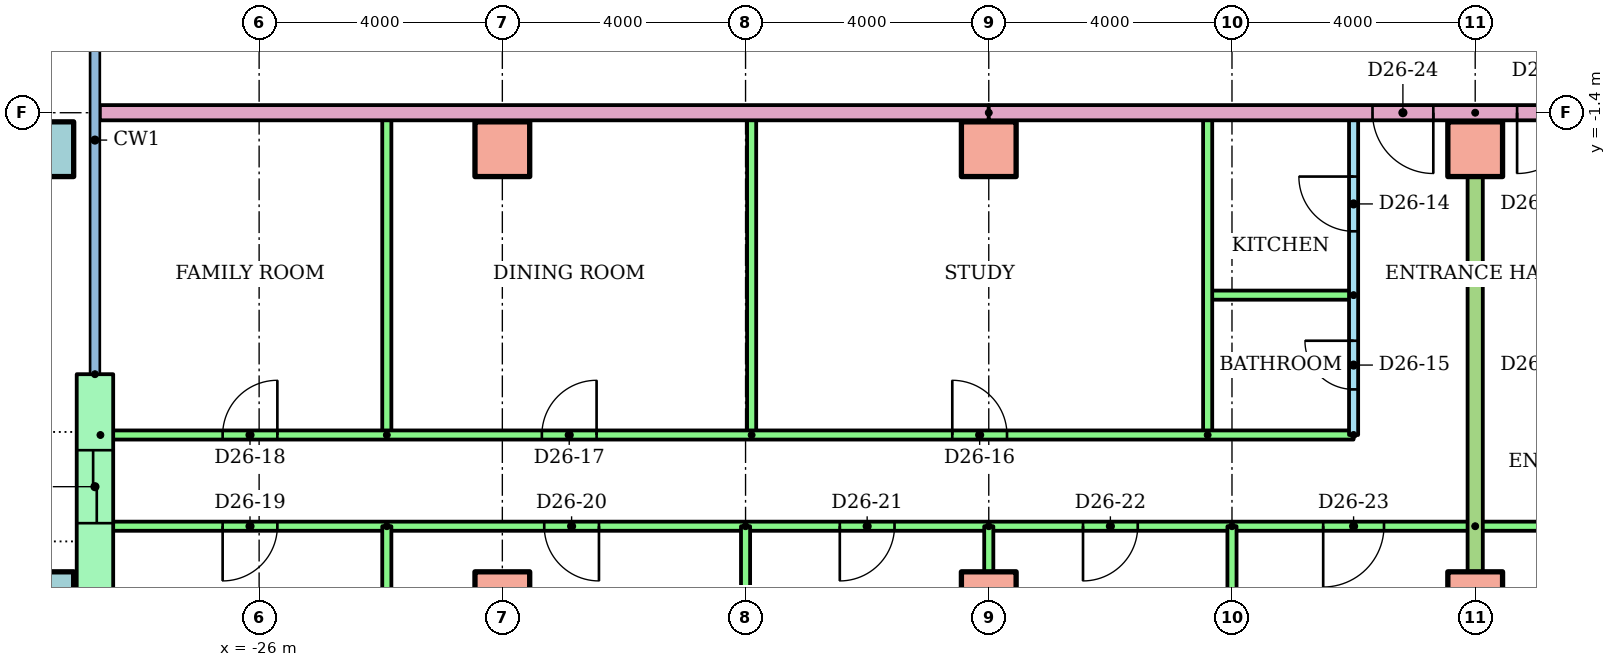
"""IFC4 building model, lengths in metres.
Left out: names, types, materials, properties, quantities, classifications, styles, units other than length and angle.
Written with IfcOpenShell. Run it as: python <this file> out.ifc"""

import sys

from ifc_helpers import new_model, si_unit, direction, frame, frame_2d, origin, origin_2d, place, context, subcontext, project, spatial, rectangle, hollow_rectangle, extrude, element, fill, save


model = new_model("IFC4")
c1 = context("Model", 3, precision=1e-05, world=origin(), true_north=direction((0.0, 1.0)))
c2 = subcontext(c1, "Body", "Model", "MODEL_VIEW")
j1 = project(units=[si_unit("LENGTHUNIT", "METRE"), si_unit("PLANEANGLEUNIT", "RADIAN")], contexts=[c1])
p1 = place(None, origin())
s1 = spatial("IfcSite", under=j1, at=p1, CompositionType="ELEMENT")
p2 = place(p1, origin())
s2 = spatial("IfcBuilding", under=s1, at=p2, CompositionType="ELEMENT")
p3 = place(p2, frame((0.0, 0.0, 99.9)))
s3 = spatial("IfcBuildingStorey", under=s2, at=p3, CompositionType="ELEMENT", Elevation=99.9)
p4 = place(p3, frame((-29.5, -9.4, 0.0)))
e1 = element("IfcColumn", 1, at=p4, inside=s3, PredefinedType="COLUMN", context=c2, shape_type="SweptSolid", body=[
    extrude(hollow_rectangle(XDim=0.9, YDim=0.9, WallThickness=0.045, at=origin_2d()), origin(), (0.0, 0.0, 1.0), 3.2),
])
for number, where in (
    (2, (-22.0, -9.4, 0.0)),
    (3, (-14.0, -9.4, 0.0)),
    (4, (-6.0, -9.4, 0.0)),
):
    element("IfcColumn", number, at=place(p3, frame(where)), inside=s3, PredefinedType="COLUMN", context=c2, shape_type="SweptSolid", body=[
        extrude(rectangle(XDim=0.9, YDim=0.9, at=origin_2d()), origin(), (0.0, 0.0, 1.0), 3.2),
    ])
p5 = place(p3, frame((-29.5, -2.0, 0.0)))
e5 = element("IfcColumn", 5, at=p5, inside=s3, PredefinedType="COLUMN", context=c2, shape_type="SweptSolid", body=[
    extrude(hollow_rectangle(XDim=0.9, YDim=0.9, WallThickness=0.045, at=origin_2d()), origin(), (0.0, 0.0, 1.0), 3.2),
])
for number, where in (
    (6, (-22.0, -2.0, 0.0)),
    (7, (-14.0, -2.0, 0.0)),
    (8, (-6.0, -2.0, 0.0)),
):
    element("IfcColumn", number, at=place(p3, frame(where)), inside=s3, PredefinedType="COLUMN", context=c2, shape_type="SweptSolid", body=[
        extrude(rectangle(XDim=0.9, YDim=0.9, at=origin_2d()), origin(), (0.0, 0.0, 1.0), 3.2),
    ])
p6 = place(p3, frame((-28.7, -5.7, 0.0), z_axis=(0.0, 0.0, 1.0), x_axis=(0.0, -1.0, 0.0)))
e9 = element("IfcWall", 9, at=p6, inside=s3, PredefinedType="STANDARD", context=c2, shape_type="SweptSolid", body=[
    extrude(rectangle(XDim=3.7, YDim=0.6, at=frame_2d((1.85, 0.0))), origin(), (0.0, 0.0, 1.0), 2.92),
])
p7 = place(p6, frame((1.25, 0.0, 0.0)))
e10 = element("IfcOpeningElement", 10, at=p7, cuts=e9, PredefinedType="OPENING", context=c2, shape_type="SweptSolid", body=[
    extrude(rectangle(XDim=1.2, YDim=2.1, at=frame_2d((0.6, 1.05))), frame((0.0, 0.31, 0.0), z_axis=(0.0, -1.0, 0.0), x_axis=(1.0, 0.0, 0.0)), (0.0, 0.0, 1.0), 0.62),
])
p8 = place(p3, frame((-8.0, -6.7, 0.0), z_axis=(0.0, 0.0, 1.0), x_axis=(0.0, 1.0, 0.0)))
e11 = element("IfcWall", 11, at=p8, inside=s3, PredefinedType="PARTITIONING", context=c2, shape_type="SweptSolid", body=[
    extrude(rectangle(XDim=5.3, YDim=0.15, at=frame_2d((2.65, 0.0))), origin(), (0.0, 0.0, 1.0), 2.4),
])
p9 = place(p8, frame((3.35, 0.0, 0.0)))
e12 = element("IfcOpeningElement", 12, at=p9, cuts=e11, PredefinedType="OPENING", context=c2, shape_type="SweptSolid", body=[
    extrude(rectangle(XDim=0.9, YDim=2.1, at=frame_2d((0.45, 1.05))), frame((0.0, 0.085, 0.0), z_axis=(0.0, -1.0, 0.0), x_axis=(1.0, 0.0, 0.0)), (0.0, 0.0, 1.0), 0.17),
])
p10 = place(p8, frame((0.75, 0.0, 0.0)))
e13 = element("IfcOpeningElement", 13, at=p10, cuts=e11, PredefinedType="OPENING", context=c2, shape_type="SweptSolid", body=[
    extrude(rectangle(XDim=0.8, YDim=2.1, at=frame_2d((0.4, 1.05))), frame((0.0, 0.085, 0.0), z_axis=(0.0, -1.0, 0.0), x_axis=(1.0, 0.0, 0.0)), (0.0, 0.0, 1.0), 0.17),
])
p11 = place(p3, frame((-8.0, -4.4, 0.0), z_axis=(0.0, 0.0, 1.0), x_axis=(-1.0, 0.0, 0.0)))
e14 = element("IfcWall", 14, at=p11, inside=s3, PredefinedType="PARTITIONING", context=c2, shape_type="SweptSolid", body=[
    extrude(rectangle(XDim=2.4, YDim=0.15, at=frame_2d((1.2, 0.0))), origin(), (0.0, 0.0, 1.0), 2.4),
])
for number, where, z_axis, x_axis in (
    (15, (-10.4, -6.7, 0.0), (0.0, 0.0, 1.0), (0.0, 1.0, 0.0)),
    (16, (-17.9, -6.7, 0.0), (0.0, 0.0, 1.0), (0.0, 1.0, 0.0)),
    (17, (-23.9, -6.7, 0.0), (0.0, 0.0, 1.0), (0.0, 1.0, 0.0)),
):
    element("IfcWall", number, at=place(p3, frame(where, z_axis=z_axis, x_axis=x_axis)), inside=s3, PredefinedType="PARTITIONING", context=c2, shape_type="SweptSolid", body=[
        extrude(rectangle(XDim=5.3, YDim=0.15, at=frame_2d((2.65, 0.0))), origin(), (0.0, 0.0, 1.0), 2.4),
    ])
p12 = place(p3, frame((-28.61, -6.7, 0.0)))
e18 = element("IfcWall", 18, at=p12, inside=s3, PredefinedType="PARTITIONING", context=c2, shape_type="SweptSolid", body=[
    extrude(rectangle(XDim=20.61, YDim=0.15, at=frame_2d((10.305, 0.0))), origin(), (0.0, 0.0, 1.0), 2.4),
])
p13 = place(p12, frame((14.01, 0.0, 0.0)))
e19 = element("IfcOpeningElement", 19, at=p13, cuts=e18, PredefinedType="OPENING", context=c2, shape_type="SweptSolid", body=[
    extrude(rectangle(XDim=0.9, YDim=2.1, at=frame_2d((0.45, 1.05))), frame((0.0, 0.085, 0.0), z_axis=(0.0, -1.0, 0.0), x_axis=(1.0, 0.0, 0.0)), (0.0, 0.0, 1.0), 0.17),
])
p14 = place(p12, frame((7.26, 0.0, 0.0)))
e20 = element("IfcOpeningElement", 20, at=p14, cuts=e18, PredefinedType="OPENING", context=c2, shape_type="SweptSolid", body=[
    extrude(rectangle(XDim=0.9, YDim=2.1, at=frame_2d((0.45, 1.05))), frame((0.0, 0.085, 0.0), z_axis=(0.0, -1.0, 0.0), x_axis=(1.0, 0.0, 0.0)), (0.0, 0.0, 1.0), 0.17),
])
p15 = place(p12, frame((2.01, 0.0, 0.0)))
e21 = element("IfcOpeningElement", 21, at=p15, cuts=e18, PredefinedType="OPENING", context=c2, shape_type="SweptSolid", body=[
    extrude(rectangle(XDim=0.9, YDim=2.1, at=frame_2d((0.45, 1.05))), frame((0.0, 0.085, 0.0), z_axis=(0.0, -1.0, 0.0), x_axis=(1.0, 0.0, 0.0)), (0.0, 0.0, 1.0), 0.17),
])
p16 = place(p3, frame((-6.0, -8.2, 0.0), z_axis=(0.0, 0.0, 1.0), x_axis=(-1.0, 0.0, 0.0)))
e22 = element("IfcWall", 22, at=p16, inside=s3, PredefinedType="PARTITIONING", context=c2, shape_type="SweptSolid", body=[
    extrude(rectangle(XDim=22.61, YDim=0.15, at=frame_2d((11.305, 0.0))), origin(), (0.0, 0.0, 1.0), 2.4),
])
p17 = place(p16, frame((19.7, 0.0, 0.0)))
e23 = element("IfcOpeningElement", 23, at=p17, cuts=e22, PredefinedType="OPENING", context=c2, shape_type="SweptSolid", body=[
    extrude(rectangle(XDim=0.9, YDim=2.1, at=frame_2d((0.45, 1.05))), frame((0.0, 0.085, 0.0), z_axis=(0.0, -1.0, 0.0), x_axis=(1.0, 0.0, 0.0)), (0.0, 0.0, 1.0), 0.17),
])
p18 = place(p16, frame((14.411, 0.0, 0.0)))
e24 = element("IfcOpeningElement", 24, at=p18, cuts=e22, PredefinedType="OPENING", context=c2, shape_type="SweptSolid", body=[
    extrude(rectangle(XDim=0.9, YDim=2.1, at=frame_2d((0.45, 1.05))), frame((0.0, 0.085, 0.0), z_axis=(0.0, -1.0, 0.0), x_axis=(1.0, 0.0, 0.0)), (0.0, 0.0, 1.0), 0.17),
])
p19 = place(p16, frame((9.55, 0.0, 0.0)))
e25 = element("IfcOpeningElement", 25, at=p19, cuts=e22, PredefinedType="OPENING", context=c2, shape_type="SweptSolid", body=[
    extrude(rectangle(XDim=0.9, YDim=2.1, at=frame_2d((0.45, 1.05))), frame((0.0, 0.085, 0.0), z_axis=(0.0, -1.0, 0.0), x_axis=(1.0, 0.0, 0.0)), (0.0, 0.0, 1.0), 0.17),
])
p20 = place(p16, frame((5.55, 0.0, 0.0)))
e26 = element("IfcOpeningElement", 26, at=p20, cuts=e22, PredefinedType="OPENING", context=c2, shape_type="SweptSolid", body=[
    extrude(rectangle(XDim=0.9, YDim=2.1, at=frame_2d((0.45, 1.05))), frame((0.0, 0.085, 0.0), z_axis=(0.0, -1.0, 0.0), x_axis=(1.0, 0.0, 0.0)), (0.0, 0.0, 1.0), 0.17),
])
p21 = place(p16, frame((1.5, 0.0, 0.0)))
e27 = element("IfcOpeningElement", 27, at=p21, cuts=e22, PredefinedType="OPENING", context=c2, shape_type="SweptSolid", body=[
    extrude(rectangle(XDim=1.0, YDim=2.1, at=frame_2d((0.5, 1.05))), frame((0.0, 0.085, 0.0), z_axis=(0.0, -1.0, 0.0), x_axis=(1.0, 0.0, 0.0)), (0.0, 0.0, 1.0), 0.17),
])
p22 = place(p3, frame((-23.9, -8.2, 0.0), z_axis=(0.0, 0.0, 1.0), x_axis=(0.0, -1.0, 0.0)))
e28 = element("IfcWall", 28, at=p22, inside=s3, PredefinedType="PARTITIONING", context=c2, shape_type="SweptSolid", body=[
    extrude(rectangle(XDim=6.22, YDim=0.15, at=frame_2d((3.11, 0.0))), origin(), (0.0, 0.0, 1.0), 2.4),
])
p23 = place(p3, frame((-18.0, -8.2, 0.0), z_axis=(0.0, 0.0, 1.0), x_axis=(0.0, -1.0, 0.0)))
e29 = element("IfcWall", 29, at=p23, inside=s3, PredefinedType="PARTITIONING", context=c2, shape_type="SweptSolid", body=[
    extrude(rectangle(XDim=8.021, YDim=0.15, at=frame_2d((4.01, 0.0))), origin(), (0.0, 0.0, 1.0), 2.4),
])
p24 = place(p3, frame((-14.0, -8.2, 0.0), z_axis=(0.0, 0.0, 1.0), x_axis=(0.0, -1.0, 0.0)))
e30 = element("IfcWall", 30, at=p24, inside=s3, PredefinedType="PARTITIONING", context=c2, shape_type="SweptSolid", body=[
    extrude(rectangle(XDim=8.01, YDim=0.15, at=frame_2d((4.005, 0.0))), origin(), (0.0, 0.0, 1.0), 2.4),
])
p25 = place(p3, frame((-10.0, -8.2, 0.0), z_axis=(0.0, 0.0, 1.0), x_axis=(0.0, -1.0, 0.0)))
e31 = element("IfcWall", 31, at=p25, inside=s3, PredefinedType="PARTITIONING", context=c2, shape_type="SweptSolid", body=[
    extrude(rectangle(XDim=8.021, YDim=0.15, at=frame_2d((4.01, 0.0))), origin(), (0.0, 0.0, 1.0), 2.4),
])
p26 = place(p3, frame((18.0, -8.2, 0.0), z_axis=(0.0, 0.0, 1.0), x_axis=(-1.0, 0.0, 0.0)))
e32 = element("IfcWall", 32, at=p26, inside=s3, PredefinedType="PARTITIONING", context=c2, shape_type="SweptSolid", body=[
    extrude(rectangle(XDim=24.0, YDim=0.15, at=frame_2d((12.0, 0.0))), origin(), (0.0, 0.0, 1.0), 2.4),
])
p27 = place(p26, frame((21.55, 0.0, 0.0)))
e33 = element("IfcOpeningElement", 33, at=p27, cuts=e32, PredefinedType="OPENING", context=c2, shape_type="SweptSolid", body=[
    extrude(rectangle(XDim=0.9, YDim=2.1, at=frame_2d((0.45, 1.05))), frame((0.0, 0.085, 0.0), z_axis=(0.0, -1.0, 0.0), x_axis=(1.0, 0.0, 0.0)), (0.0, 0.0, 1.0), 0.17),
])
p28 = place(p26, frame((17.55, 0.0, 0.0)))
e34 = element("IfcOpeningElement", 34, at=p28, cuts=e32, PredefinedType="OPENING", context=c2, shape_type="SweptSolid", body=[
    extrude(rectangle(XDim=0.9, YDim=2.1, at=frame_2d((0.45, 1.05))), frame((0.0, 0.085, 0.0), z_axis=(0.0, -1.0, 0.0), x_axis=(1.0, 0.0, 0.0)), (0.0, 0.0, 1.0), 0.17),
])
p29 = place(p26, frame((13.55, 0.0, 0.0)))
e35 = element("IfcOpeningElement", 35, at=p29, cuts=e32, PredefinedType="OPENING", context=c2, shape_type="SweptSolid", body=[
    extrude(rectangle(XDim=0.9, YDim=2.1, at=frame_2d((0.45, 1.05))), frame((0.0, 0.085, 0.0), z_axis=(0.0, -1.0, 0.0), x_axis=(1.0, 0.0, 0.0)), (0.0, 0.0, 1.0), 0.17),
])
p30 = place(p26, frame((9.55, 0.0, 0.0)))
e36 = element("IfcOpeningElement", 36, at=p30, cuts=e32, PredefinedType="OPENING", context=c2, shape_type="SweptSolid", body=[
    extrude(rectangle(XDim=0.9, YDim=2.1, at=frame_2d((0.45, 1.05))), frame((0.0, 0.085, 0.0), z_axis=(0.0, -1.0, 0.0), x_axis=(1.0, 0.0, 0.0)), (0.0, 0.0, 1.0), 0.17),
])
p31 = place(p26, frame((3.5, 0.0, 0.0)))
e37 = element("IfcOpeningElement", 37, at=p31, cuts=e32, PredefinedType="OPENING", context=c2, shape_type="SweptSolid", body=[
    extrude(rectangle(XDim=1.0, YDim=2.1, at=frame_2d((0.5, 1.05))), frame((0.0, 0.085, 0.0), z_axis=(0.0, -1.0, 0.0), x_axis=(1.0, 0.0, 0.0)), (0.0, 0.0, 1.0), 0.17),
])
p32 = place(p3, frame((-6.0, -1.4, 0.0), z_axis=(0.0, 0.0, 1.0), x_axis=(0.0, -1.0, 0.0)))
e38 = element("IfcWall", 38, at=p32, inside=s3, PredefinedType="PARTITIONING", context=c2, shape_type="SweptSolid", body=[
    extrude(rectangle(XDim=14.81, YDim=0.25, at=frame_2d((7.405, 0.0))), origin(), (0.0, 0.0, 1.0), 2.4),
])
p33 = place(p3, frame((-14.0, -1.4, 0.0), z_axis=(0.0, 0.0, 1.0), x_axis=(-1.0, 0.0, 0.0)))
e39 = element("IfcWall", 39, at=p33, inside=s3, PredefinedType="PARTITIONING", context=c2, shape_type="SweptSolid", body=[
    extrude(rectangle(XDim=14.62, YDim=0.25, at=frame_2d((7.31, 0.0))), origin(), (0.0, 0.0, 1.0), 2.4),
])
p34 = place(p3, frame((14.0, -1.4, 0.0), z_axis=(0.0, 0.0, 1.0), x_axis=(-1.0, 0.0, 0.0)))
e40 = element("IfcWall", 40, at=p34, inside=s3, PredefinedType="PARTITIONING", context=c2, shape_type="SweptSolid", body=[
    extrude(rectangle(XDim=28.0, YDim=0.25, at=frame_2d((14.0, 0.0))), origin(), (0.0, 0.0, 1.0), 2.4),
])
p35 = place(p34, frame((20.689, 0.0, 0.0)))
e41 = element("IfcOpeningElement", 41, at=p35, cuts=e40, PredefinedType="OPENING", context=c2, shape_type="SweptSolid", body=[
    extrude(rectangle(XDim=1.0, YDim=2.1, at=frame_2d((0.5, 1.05))), frame((0.0, 0.135, 0.0), z_axis=(0.0, -1.0, 0.0), x_axis=(1.0, 0.0, 0.0)), (0.0, 0.0, 1.0), 0.27),
])
p36 = place(p34, frame((18.311, 0.0, 0.0)))
e42 = element("IfcOpeningElement", 42, at=p36, cuts=e40, PredefinedType="OPENING", context=c2, shape_type="SweptSolid", body=[
    extrude(rectangle(XDim=1.0, YDim=2.1, at=frame_2d((0.5, 1.05))), frame((0.0, 0.135, 0.0), z_axis=(0.0, -1.0, 0.0), x_axis=(1.0, 0.0, 0.0)), (0.0, 0.0, 1.0), 0.27),
])
p37 = place(p9, origin())
e43 = element("IfcDoor", 43, at=p37, inside=s3, OperationType="SINGLE_SWING_RIGHT", PredefinedType="DOOR", context=c2, shape_type="SweptSolid", body=[
    extrude(rectangle(XDim=0.9, YDim=2.1, at=frame_2d((0.45, 1.05))), frame((0.0, 0.025, 0.0), z_axis=(0.0, -1.0, 0.0), x_axis=(1.0, 0.0, 0.0)), (0.0, 0.0, 1.0), 0.05),
])
fill(e12, e43)
p38 = place(p10, origin())
e44 = element("IfcDoor", 44, at=p38, inside=s3, OperationType="SINGLE_SWING_RIGHT", PredefinedType="DOOR", context=c2, shape_type="SweptSolid", body=[
    extrude(rectangle(XDim=0.8, YDim=2.1, at=frame_2d((0.4, 1.05))), frame((0.0, 0.025, 0.0), z_axis=(0.0, -1.0, 0.0), x_axis=(1.0, 0.0, 0.0)), (0.0, 0.0, 1.0), 0.05),
])
fill(e13, e44)
p39 = place(p13, origin())
e45 = element("IfcDoor", 45, at=p39, inside=s3, OperationType="SINGLE_SWING_LEFT", PredefinedType="DOOR", context=c2, shape_type="SweptSolid", body=[
    extrude(rectangle(XDim=0.9, YDim=2.1, at=frame_2d((0.45, 1.05))), frame((0.0, 0.025, 0.0), z_axis=(0.0, -1.0, 0.0), x_axis=(1.0, 0.0, 0.0)), (0.0, 0.0, 1.0), 0.05),
])
fill(e19, e45)
p40 = place(p14, origin())
e46 = element("IfcDoor", 46, at=p40, inside=s3, OperationType="SINGLE_SWING_RIGHT", PredefinedType="DOOR", context=c2, shape_type="SweptSolid", body=[
    extrude(rectangle(XDim=0.9, YDim=2.1, at=frame_2d((0.45, 1.05))), frame((0.0, 0.025, 0.0), z_axis=(0.0, -1.0, 0.0), x_axis=(1.0, 0.0, 0.0)), (0.0, 0.0, 1.0), 0.05),
])
fill(e20, e46)
p41 = place(p15, origin())
e47 = element("IfcDoor", 47, at=p41, inside=s3, OperationType="SINGLE_SWING_RIGHT", PredefinedType="DOOR", context=c2, shape_type="SweptSolid", body=[
    extrude(rectangle(XDim=0.9, YDim=2.1, at=frame_2d((0.45, 1.05))), frame((0.0, 0.025, 0.0), z_axis=(0.0, -1.0, 0.0), x_axis=(1.0, 0.0, 0.0)), (0.0, 0.0, 1.0), 0.05),
])
fill(e21, e47)
p42 = place(p17, origin())
e48 = element("IfcDoor", 48, at=p42, inside=s3, OperationType="SINGLE_SWING_RIGHT", PredefinedType="DOOR", context=c2, shape_type="SweptSolid", body=[
    extrude(rectangle(XDim=0.9, YDim=2.1, at=frame_2d((0.45, 1.05))), frame((0.0, 0.025, 0.0), z_axis=(0.0, -1.0, 0.0), x_axis=(1.0, 0.0, 0.0)), (0.0, 0.0, 1.0), 0.05),
])
fill(e23, e48)
p43 = place(p18, origin())
e49 = element("IfcDoor", 49, at=p43, inside=s3, OperationType="SINGLE_SWING_LEFT", PredefinedType="DOOR", context=c2, shape_type="SweptSolid", body=[
    extrude(rectangle(XDim=0.9, YDim=2.1, at=frame_2d((0.45, 1.05))), frame((0.0, 0.025, 0.0), z_axis=(0.0, -1.0, 0.0), x_axis=(1.0, 0.0, 0.0)), (0.0, 0.0, 1.0), 0.05),
])
fill(e24, e49)
p44 = place(p19, origin())
e50 = element("IfcDoor", 50, at=p44, inside=s3, OperationType="SINGLE_SWING_RIGHT", PredefinedType="DOOR", context=c2, shape_type="SweptSolid", body=[
    extrude(rectangle(XDim=0.9, YDim=2.1, at=frame_2d((0.45, 1.05))), frame((0.0, 0.025, 0.0), z_axis=(0.0, -1.0, 0.0), x_axis=(1.0, 0.0, 0.0)), (0.0, 0.0, 1.0), 0.05),
])
fill(e25, e50)
p45 = place(p20, origin())
e51 = element("IfcDoor", 51, at=p45, inside=s3, OperationType="SINGLE_SWING_RIGHT", PredefinedType="DOOR", context=c2, shape_type="SweptSolid", body=[
    extrude(rectangle(XDim=0.9, YDim=2.1, at=frame_2d((0.45, 1.05))), frame((0.0, 0.025, 0.0), z_axis=(0.0, -1.0, 0.0), x_axis=(1.0, 0.0, 0.0)), (0.0, 0.0, 1.0), 0.05),
])
fill(e26, e51)
p46 = place(p21, origin())
e52 = element("IfcDoor", 52, at=p46, inside=s3, OperationType="SINGLE_SWING_RIGHT", PredefinedType="DOOR", context=c2, shape_type="SweptSolid", body=[
    extrude(rectangle(XDim=1.0, YDim=2.1, at=frame_2d((0.5, 1.05))), frame((0.0, 0.025, 0.0), z_axis=(0.0, -1.0, 0.0), x_axis=(1.0, 0.0, 0.0)), (0.0, 0.0, 1.0), 0.05),
])
fill(e27, e52)
p47 = place(p35, origin())
e53 = element("IfcDoor", 53, at=p47, inside=s3, OperationType="SINGLE_SWING_LEFT", PredefinedType="DOOR", context=c2, shape_type="SweptSolid", body=[
    extrude(rectangle(XDim=1.0, YDim=2.1, at=frame_2d((0.5, 1.05))), frame((0.0, 0.025, 0.0), z_axis=(0.0, -1.0, 0.0), x_axis=(1.0, 0.0, 0.0)), (0.0, 0.0, 1.0), 0.05),
])
fill(e41, e53)
p48 = place(p36, origin())
e54 = element("IfcDoor", 54, at=p48, inside=s3, OperationType="SINGLE_SWING_RIGHT", PredefinedType="DOOR", context=c2, shape_type="SweptSolid", body=[
    extrude(rectangle(XDim=1.0, YDim=2.1, at=frame_2d((0.5, 1.05))), frame((0.0, 0.025, 0.0), z_axis=(0.0, -1.0, 0.0), x_axis=(1.0, 0.0, 0.0)), (0.0, 0.0, 1.0), 0.05),
])
fill(e42, e54)
p49 = place(p7, origin())
e55 = element("IfcDoor", 55, at=p49, inside=s3, OperationType="SLIDING_TO_LEFT", PredefinedType="DOOR", context=c2, shape_type="SweptSolid", body=[
    extrude(rectangle(XDim=1.2, YDim=2.1, at=frame_2d((0.6, 1.05))), frame((0.0, 0.025, 0.0), z_axis=(0.0, -1.0, 0.0), x_axis=(1.0, 0.0, 0.0)), (0.0, 0.0, 1.0), 0.05),
])
fill(e10, e55)
save(model, sys.argv[1])
